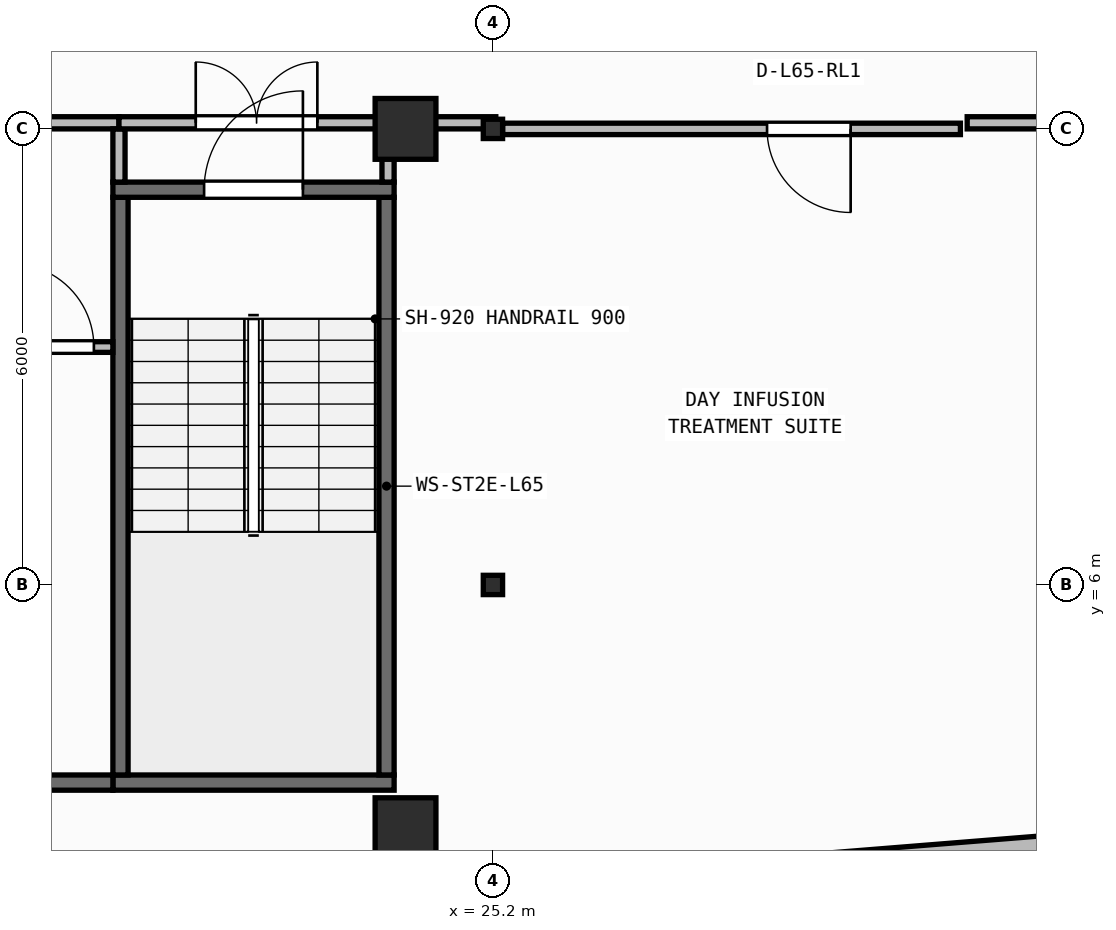
"""IFC4 building model, lengths in metres.
Left out: names, types, materials, properties, quantities, classifications, styles, units other than length and angle.
Written with IfcOpenShell. Run it as: python <this file> out.ifc"""

import sys

from ifc_helpers import new_model, si_unit, direction, frame, frame_2d, origin, origin_2d, place, context, subcontext, project, spatial, rectangle, i_section, extrude, element, fill, save


model = new_model("IFC4")
c1 = context("Model", 3, precision=1e-05, world=origin(), true_north=direction((0.0, 1.0)))
c2 = subcontext(c1, "Body", "Model", "MODEL_VIEW")
j1 = project(units=[si_unit("LENGTHUNIT", "METRE"), si_unit("PLANEANGLEUNIT", "RADIAN")], contexts=[c1])
p1 = place(None, origin())
s1 = spatial("IfcSite", under=j1, at=p1, CompositionType="ELEMENT")
p2 = place(p1, origin())
s2 = spatial("IfcBuilding", under=s1, at=p2, CompositionType="ELEMENT")
p3 = place(p2, frame((0.0, 0.0, 264.45)))
s3 = spatial("IfcBuildingStorey", under=s2, at=p3, CompositionType="ELEMENT", Elevation=264.45)
p4 = place(p3, frame((24.05, 2.8, 0.0), z_axis=(0.0, 0.0, 1.0), x_axis=(1.0, 0.0, 0.0)))
e1 = element("IfcColumn", 1, at=p4, inside=s3, PredefinedType="COLUMN", context=c2, shape_type="SweptSolid", body=[
    extrude(rectangle(XDim=0.8, YDim=0.8, at=origin_2d()), origin(), (0.0, 0.0, 1.0), 3.95),
])
p5 = place(p3, frame((25.2, 6.0, 0.0), z_axis=(0.0, 0.0, 1.0), x_axis=(1.0, 0.0, 0.0)))
e2 = element("IfcColumn", 2, at=p5, inside=s3, PredefinedType="COLUMN", context=c2, shape_type="SweptSolid", body=[
    extrude(i_section(OverallWidth=0.254, OverallDepth=0.254, WebThickness=0.009, FlangeThickness=0.014, FilletRadius=0.013, at=origin_2d()), origin(), (0.0, 0.0, 1.0), 3.95),
])
p6 = place(p3, frame((24.05, 12.0, 0.0), z_axis=(0.0, 0.0, 1.0), x_axis=(1.0, 0.0, 0.0)))
e3 = element("IfcColumn", 3, at=p6, inside=s3, PredefinedType="COLUMN", context=c2, shape_type="SweptSolid", body=[
    extrude(rectangle(XDim=0.8, YDim=0.8, at=origin_2d()), origin(), (0.0, 0.0, 1.0), 3.95),
])
p7 = place(p3, frame((25.2, 12.0, 0.0), z_axis=(0.0, 0.0, 1.0), x_axis=(1.0, 0.0, 0.0)))
e4 = element("IfcColumn", 4, at=p7, inside=s3, PredefinedType="COLUMN", context=c2, shape_type="SweptSolid", body=[
    extrude(i_section(OverallWidth=0.254, OverallDepth=0.254, WebThickness=0.009, FlangeThickness=0.014, FilletRadius=0.013, at=origin_2d()), origin(), (0.0, 0.0, 1.0), 3.95),
])
p8 = place(p3, frame((2.56, 0.173, 0.0), z_axis=(0.0, 0.0, 1.0), x_axis=(0.996798206282, 0.079958338856, 0.0)))
e5 = element("IfcWall", 5, at=p8, inside=s3, PredefinedType="STANDARD", context=c2, shape_type="SweptSolid", body=[
    extrude(rectangle(XDim=37.199, YDim=0.26, at=frame_2d((18.6, 0.0))), origin(), (0.0, 0.0, 1.0), 3.71),
])
p9 = place(p8, frame((17.4, 0.0, 0.9)))
e6 = element("IfcOpeningElement", 6, at=p9, cuts=e5, PredefinedType="OPENING", context=c2, shape_type="SweptSolid", body=[
    extrude(rectangle(XDim=2.4, YDim=1.65, at=frame_2d((1.2, 0.825))), frame((0.0, 0.14, 0.0), z_axis=(0.0, -1.0, 0.0), x_axis=(1.0, 0.0, 0.0)), (0.0, 0.0, 1.0), 0.28),
])
p10 = place(p3, frame((20.2, 3.4, 0.0), z_axis=(0.0, 0.0, 1.0), x_axis=(1.0, 0.0, 0.0)))
e7 = element("IfcWall", 7, at=p10, inside=s3, PredefinedType="SHEAR", context=c2, shape_type="SweptSolid", body=[
    extrude(rectangle(XDim=3.7, YDim=0.2, at=frame_2d((1.85, 0.0))), origin(), (0.0, 0.0, 1.0), 3.71),
])
for number, where, z_axis, x_axis in (
    (8, (20.3, 3.5, 0.0), (0.0, 0.0, 1.0), (0.0, 1.0, 0.0)),
    (9, (23.8, 3.5, 0.0), (0.0, 0.0, 1.0), (0.0, 1.0, 0.0)),
):
    element("IfcWall", number, at=place(p3, frame(where, z_axis=z_axis, x_axis=x_axis)), inside=s3, PredefinedType="SHEAR", context=c2, shape_type="SweptSolid", body=[
        extrude(rectangle(XDim=7.6, YDim=0.2, at=frame_2d((3.8, 0.0))), origin(), (0.0, 0.0, 1.0), 3.71),
    ])
p11 = place(p3, frame((20.2, 11.2, 0.0), z_axis=(0.0, 0.0, 1.0), x_axis=(1.0, 0.0, 0.0)))
e10 = element("IfcWall", 10, at=p11, inside=s3, PredefinedType="SHEAR", context=c2, shape_type="SweptSolid", body=[
    extrude(rectangle(XDim=3.7, YDim=0.2, at=frame_2d((1.85, 0.0))), origin(), (0.0, 0.0, 1.0), 3.71),
])
p12 = place(p11, frame((1.2, 0.0, 0.0)))
e11 = element("IfcOpeningElement", 11, at=p12, cuts=e10, PredefinedType="OPENING", context=c2, shape_type="SweptSolid", body=[
    extrude(rectangle(XDim=1.3, YDim=2.15, at=frame_2d((0.65, 1.075))), frame((0.0, 0.11, 0.0), z_axis=(0.0, -1.0, 0.0), x_axis=(1.0, 0.0, 0.0)), (0.0, 0.0, 1.0), 0.22),
])
p13 = place(p3, frame((6.5, 3.4, 0.0), z_axis=(0.0, 0.0, 1.0), x_axis=(1.0, 0.0, 0.0)))
e12 = element("IfcWall", 12, at=p13, inside=s3, PredefinedType="SHEAR", context=c2, shape_type="SweptSolid", body=[
    extrude(rectangle(XDim=13.7, YDim=0.2, at=frame_2d((6.85, 0.0))), origin(), (0.0, 0.0, 1.0), 3.71),
])
p14 = place(p3, frame((18.61, 9.13, 0.0), z_axis=(0.0, 0.0, 1.0), x_axis=(1.0, 0.0, 0.0)))
e13 = element("IfcWall", 13, at=p14, inside=s3, PredefinedType="PARTITIONING", context=c2, shape_type="SweptSolid", body=[
    extrude(rectangle(XDim=1.59, YDim=0.14, at=frame_2d((0.795, 0.0))), origin(), (0.0, 0.0, 1.0), 3.71),
])
p15 = place(p14, frame((0.24, 0.0, 0.0)))
e14 = element("IfcOpeningElement", 14, at=p15, cuts=e13, PredefinedType="OPENING", context=c2, shape_type="SweptSolid", body=[
    extrude(rectangle(XDim=1.1, YDim=2.1, at=frame_2d((0.55, 1.05))), frame((0.0, 0.08, 0.0), z_axis=(0.0, -1.0, 0.0), x_axis=(1.0, 0.0, 0.0)), (0.0, 0.0, 1.0), 0.16),
])
p16 = place(p3, frame((12.58, 12.08, 0.0), z_axis=(0.0, 0.0, 1.0), x_axis=(1.0, 0.0, 0.0)))
e15 = element("IfcWall", 15, at=p16, inside=s3, PredefinedType="PARTITIONING", context=c2, shape_type="SweptSolid", body=[
    extrude(rectangle(XDim=7.7, YDim=0.16, at=frame_2d((3.85, 0.0))), origin(), (0.0, 0.0, 1.0), 3.157),
])
p17 = place(p16, frame((3.05, 0.0, 0.0)))
e16 = element("IfcOpeningElement", 16, at=p17, cuts=e15, PredefinedType="OPENING", context=c2, shape_type="SweptSolid", body=[
    extrude(rectangle(XDim=1.6, YDim=2.05, at=frame_2d((0.8, 1.025))), frame((0.0, 0.09, 0.0), z_axis=(0.0, -1.0, 0.0), x_axis=(1.0, 0.0, 0.0)), (0.0, 0.0, 1.0), 0.18),
])
p18 = place(p3, frame((20.28, 11.3, 0.0), z_axis=(0.0, 0.0, 1.0), x_axis=(0.0, 1.0, 0.0)))
e17 = element("IfcWall", 17, at=p18, inside=s3, PredefinedType="PARTITIONING", context=c2, shape_type="SweptSolid", body=[
    extrude(rectangle(XDim=0.7, YDim=0.16, at=frame_2d((0.35, 0.0))), origin(), (0.0, 0.0, 1.0), 3.71),
])
p19 = place(p3, frame((20.28, 12.08, 0.0), z_axis=(0.0, 0.0, 1.0), x_axis=(1.0, 0.0, 0.0)))
e18 = element("IfcWall", 18, at=p19, inside=s3, PredefinedType="PARTITIONING", context=c2, shape_type="SweptSolid", body=[
    extrude(rectangle(XDim=3.62, YDim=0.16, at=frame_2d((1.81, 0.0))), origin(), (0.0, 0.0, 1.0), 3.157),
])
p20 = place(p19, frame((1.01, 0.0, 0.0)))
e19 = element("IfcOpeningElement", 19, at=p20, cuts=e18, PredefinedType="OPENING", context=c2, shape_type="SweptSolid", body=[
    extrude(rectangle(XDim=1.6, YDim=2.05, at=frame_2d((0.8, 1.025))), frame((0.0, 0.09, 0.0), z_axis=(0.0, -1.0, 0.0), x_axis=(1.0, 0.0, 0.0)), (0.0, 0.0, 1.0), 0.18),
])
p21 = place(p3, frame((23.82, 11.3, 0.0), z_axis=(0.0, 0.0, 1.0), x_axis=(0.0, 1.0, 0.0)))
e20 = element("IfcWall", 20, at=p21, inside=s3, PredefinedType="PARTITIONING", context=c2, shape_type="SweptSolid", body=[
    extrude(rectangle(XDim=0.7, YDim=0.16, at=frame_2d((0.35, 0.0))), origin(), (0.0, 0.0, 1.0), 3.71),
])
p22 = place(p3, frame((31.35, 12.0, 0.0), z_axis=(0.0, 0.0, 1.0), x_axis=(-1.0, 0.0, 0.0)))
e21 = element("IfcWall", 21, at=p22, inside=s3, PredefinedType="PARTITIONING", context=c2, shape_type="SweptSolid", body=[
    extrude(rectangle(XDim=6.023, YDim=0.15, at=frame_2d((3.012, 0.0))), origin(), (0.0, 0.0, 1.0), 3.157),
])
p23 = place(p22, frame((1.444, 0.0, 0.0)))
e22 = element("IfcOpeningElement", 22, at=p23, cuts=e21, PredefinedType="OPENING", context=c2, shape_type="SweptSolid", body=[
    extrude(rectangle(XDim=1.1, YDim=2.1, at=frame_2d((0.55, 1.05))), frame((0.0, 0.085, 0.0), z_axis=(0.0, -1.0, 0.0), x_axis=(1.0, 0.0, 0.0)), (0.0, 0.0, 1.0), 0.17),
])
p24 = place(p3, frame((24.02, 12.08, 0.0), z_axis=(0.0, 0.0, 1.0), x_axis=(1.0, 0.0, 0.0)))
e23 = element("IfcWall", 23, at=p24, inside=s3, PredefinedType="PARTITIONING", context=c2, shape_type="SweptSolid", body=[
    extrude(rectangle(XDim=1.218, YDim=0.16, at=frame_2d((0.609, 0.0))), origin(), (0.0, 0.0, 1.0), 3.157),
])
p25 = place(p3, frame((31.439, 12.08, 0.0), z_axis=(0.0, 0.0, 1.0), x_axis=(1.0, 0.0, 0.0)))
e24 = element("IfcWall", 24, at=p25, inside=s3, PredefinedType="PARTITIONING", context=c2, shape_type="SweptSolid", body=[
    extrude(rectangle(XDim=2.198, YDim=0.16, at=frame_2d((1.099, 0.0))), origin(), (0.0, 0.0, 1.0), 3.157),
])
p26 = place(p12, origin())
e25 = element("IfcDoor", 25, at=p26, inside=s3, OperationType="SINGLE_SWING_RIGHT", PredefinedType="DOOR", context=c2, shape_type="SweptSolid", body=[
    extrude(rectangle(XDim=1.3, YDim=2.15, at=frame_2d((0.65, 1.075))), frame((0.0, 0.025, 0.0), z_axis=(0.0, -1.0, 0.0), x_axis=(1.0, 0.0, 0.0)), (0.0, 0.0, 1.0), 0.05),
])
fill(e11, e25)
p27 = place(p15, origin())
e26 = element("IfcDoor", 26, at=p27, inside=s3, OperationType="SINGLE_SWING_LEFT", PredefinedType="DOOR", context=c2, shape_type="SweptSolid", body=[
    extrude(rectangle(XDim=1.1, YDim=2.1, at=frame_2d((0.55, 1.05))), frame((0.0, 0.025, 0.0), z_axis=(0.0, -1.0, 0.0), x_axis=(1.0, 0.0, 0.0)), (0.0, 0.0, 1.0), 0.05),
])
fill(e14, e26)
p28 = place(p20, origin())
e27 = element("IfcDoor", 27, at=p28, inside=s3, OperationType="DOUBLE_DOOR_SINGLE_SWING", PredefinedType="DOOR", context=c2, shape_type="SweptSolid", body=[
    extrude(rectangle(XDim=1.6, YDim=2.05, at=frame_2d((0.8, 1.025))), frame((0.0, 0.025, 0.0), z_axis=(0.0, -1.0, 0.0), x_axis=(1.0, 0.0, 0.0)), (0.0, 0.0, 1.0), 0.05),
])
fill(e19, e27)
p29 = place(p23, origin())
e28 = element("IfcDoor", 28, at=p29, inside=s3, OperationType="SINGLE_SWING_LEFT", PredefinedType="DOOR", context=c2, shape_type="SweptSolid", body=[
    extrude(rectangle(XDim=1.1, YDim=2.1, at=frame_2d((0.55, 1.05))), frame((0.0, 0.025, 0.0), z_axis=(0.0, -1.0, 0.0), x_axis=(1.0, 0.0, 0.0)), (0.0, 0.0, 1.0), 0.05),
])
fill(e22, e28)
save(model, sys.argv[1])
